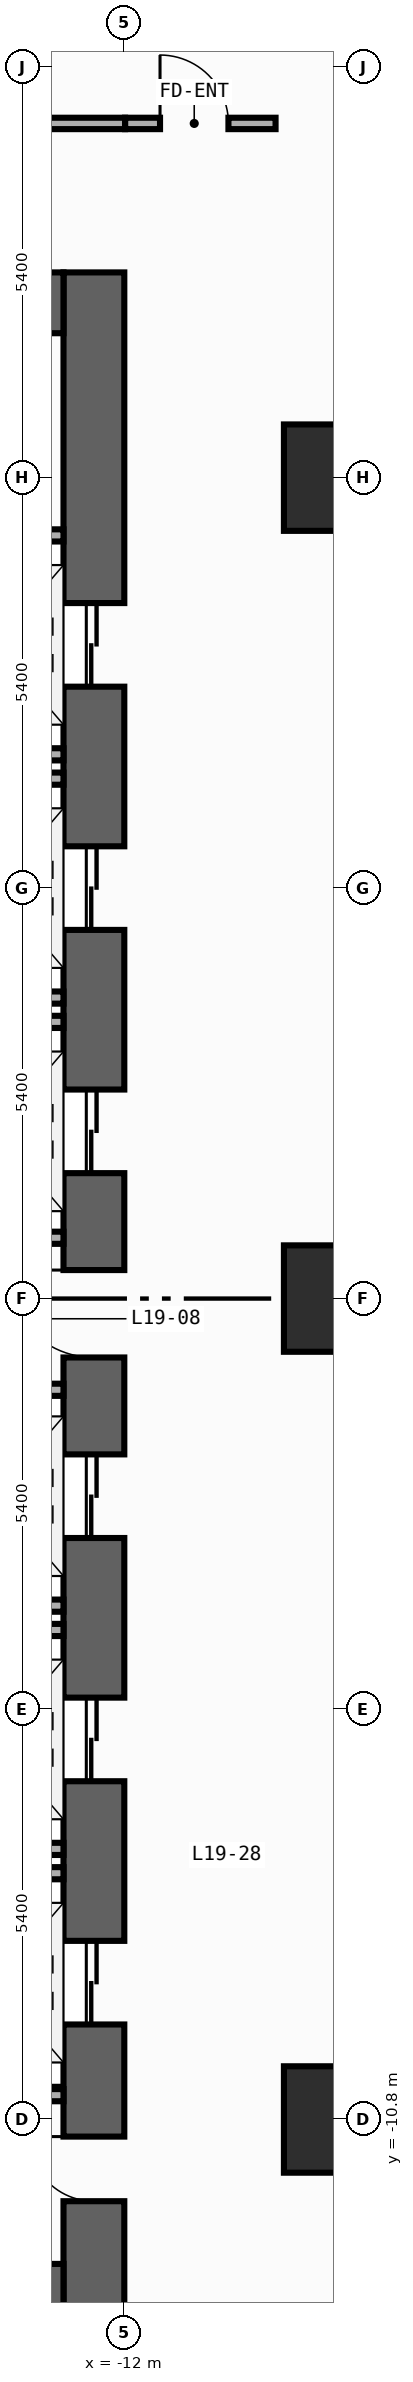
"""IFC4 building model, lengths in metres.
Left out: names, types, materials, properties, quantities, classifications, styles, units other than length and angle.
Written with IfcOpenShell. Run it as: python <this file> out.ifc"""

import sys

from ifc_helpers import new_model, si_unit, direction, frame, frame_2d, origin, origin_2d, place, context, subcontext, project, spatial, rectangle, extrude, element, fill, save


model = new_model("IFC4")
c1 = context("Model", 3, precision=1e-05, world=origin(), true_north=direction((0.0, 1.0)))
c2 = subcontext(c1, "Body", "Model", "MODEL_VIEW")
j1 = project(units=[si_unit("LENGTHUNIT", "METRE"), si_unit("PLANEANGLEUNIT", "RADIAN")], contexts=[c1])
p1 = place(None, origin())
s1 = spatial("IfcSite", under=j1, at=p1, CompositionType="ELEMENT")
p2 = place(p1, origin())
s2 = spatial("IfcBuilding", under=s1, at=p2, CompositionType="ELEMENT")
p3 = place(p2, frame((0.0, 0.0, 80.6)))
s3 = spatial("IfcBuildingStorey", under=s2, at=p3, CompositionType="ELEMENT", Elevation=80.6)
p4 = place(p3, frame((-12.4, -13.5, 0.0), z_axis=(0.0, 0.0, 1.0), x_axis=(0.0, 1.0, 0.0)))
e1 = element("IfcWall", 1, at=p4, inside=s3, PredefinedType="SHEAR", context=c2, shape_type="SweptSolid", body=[
    extrude(rectangle(XDim=27.0, YDim=0.8, at=frame_2d((13.5, 0.0))), origin(), (0.0, 0.0, 1.0), 3.85),
])
p5 = place(p4, frame((21.55, 0.0, 0.0)))
e2 = element("IfcOpeningElement", 2, at=p5, cuts=e1, PredefinedType="OPENING", context=c2, shape_type="SweptSolid", body=[
    extrude(rectangle(XDim=1.1, YDim=2.2, at=frame_2d((0.55, 1.1))), frame((0.0, 0.41, 0.0), z_axis=(0.0, -1.0, 0.0), x_axis=(1.0, 0.0, 0.0)), (0.0, 0.0, 1.0), 0.82),
])
p6 = place(p4, frame((18.35, 0.0, 0.0)))
e3 = element("IfcOpeningElement", 3, at=p6, cuts=e1, PredefinedType="OPENING", context=c2, shape_type="SweptSolid", body=[
    extrude(rectangle(XDim=1.1, YDim=2.2, at=frame_2d((0.55, 1.1))), frame((0.0, 0.41, 0.0), z_axis=(0.0, -1.0, 0.0), x_axis=(1.0, 0.0, 0.0)), (0.0, 0.0, 1.0), 0.82),
])
p7 = place(p4, frame((15.15, 0.0, 0.0)))
e4 = element("IfcOpeningElement", 4, at=p7, cuts=e1, PredefinedType="OPENING", context=c2, shape_type="SweptSolid", body=[
    extrude(rectangle(XDim=1.1, YDim=2.2, at=frame_2d((0.55, 1.1))), frame((0.0, 0.41, 0.0), z_axis=(0.0, -1.0, 0.0), x_axis=(1.0, 0.0, 0.0)), (0.0, 0.0, 1.0), 0.82),
])
p8 = place(p4, frame((10.35, 0.0, 0.0)))
e5 = element("IfcOpeningElement", 5, at=p8, cuts=e1, PredefinedType="OPENING", context=c2, shape_type="SweptSolid", body=[
    extrude(rectangle(XDim=1.1, YDim=2.2, at=frame_2d((0.55, 1.1))), frame((0.0, 0.41, 0.0), z_axis=(0.0, -1.0, 0.0), x_axis=(1.0, 0.0, 0.0)), (0.0, 0.0, 1.0), 0.82),
])
p9 = place(p4, frame((7.15, 0.0, 0.0)))
e6 = element("IfcOpeningElement", 6, at=p9, cuts=e1, PredefinedType="OPENING", context=c2, shape_type="SweptSolid", body=[
    extrude(rectangle(XDim=1.1, YDim=2.2, at=frame_2d((0.55, 1.1))), frame((0.0, 0.41, 0.0), z_axis=(0.0, -1.0, 0.0), x_axis=(1.0, 0.0, 0.0)), (0.0, 0.0, 1.0), 0.82),
])
p10 = place(p4, frame((3.95, 0.0, 0.0)))
e7 = element("IfcOpeningElement", 7, at=p10, cuts=e1, PredefinedType="OPENING", context=c2, shape_type="SweptSolid", body=[
    extrude(rectangle(XDim=1.1, YDim=2.2, at=frame_2d((0.55, 1.1))), frame((0.0, 0.41, 0.0), z_axis=(0.0, -1.0, 0.0), x_axis=(1.0, 0.0, 0.0)), (0.0, 0.0, 1.0), 0.82),
])
p11 = place(p4, frame((12.725, 0.0, 0.0)))
e8 = element("IfcOpeningElement", 8, at=p11, cuts=e1, PredefinedType="OPENING", context=c2, shape_type="SweptSolid", body=[
    extrude(rectangle(XDim=1.15, YDim=2.2, at=frame_2d((0.575, 1.1))), frame((0.0, 0.41, 0.0), z_axis=(0.0, -1.0, 0.0), x_axis=(1.0, 0.0, 0.0)), (0.0, 0.0, 1.0), 0.82),
])
p12 = place(p4, frame((1.625, 0.0, 0.0)))
e9 = element("IfcOpeningElement", 9, at=p12, cuts=e1, PredefinedType="OPENING", context=c2, shape_type="SweptSolid", body=[
    extrude(rectangle(XDim=0.85, YDim=2.1, at=frame_2d((0.425, 1.05))), frame((0.0, 0.41, 0.0), z_axis=(0.0, -1.0, 0.0), x_axis=(1.0, 0.0, 0.0)), (0.0, 0.0, 1.0), 0.82),
])
for number, where, z_axis, x_axis in (
    (10, (-19.6, -13.1, 0.0), (0.0, 0.0, 1.0), (1.0, 0.0, 0.0)),
    (11, (-19.6, 13.1, 0.0), (0.0, 0.0, 1.0), (1.0, 0.0, 0.0)),
):
    element("IfcWall", number, at=place(p3, frame(where, z_axis=z_axis, x_axis=x_axis)), inside=s3, PredefinedType="SHEAR", context=c2, shape_type="SweptSolid", body=[
        extrude(rectangle(XDim=6.8, YDim=0.8, at=frame_2d((3.4, 0.0))), origin(), (0.0, 0.0, 1.0), 3.85),
    ])
for number, where, z_axis, x_axis in (
    (12, (-9.2, -10.8, 0.0), (0.0, 0.0, 1.0), (1.0, 0.0, 0.0)),
    (13, (-9.2, 0.0, 0.0), (0.0, 0.0, 1.0), (1.0, 0.0, 0.0)),
    (14, (-9.2, 10.8, 0.0), (0.0, 0.0, 1.0), (1.0, 0.0, 0.0)),
):
    element("IfcColumn", number, at=place(p3, frame(where, z_axis=z_axis, x_axis=x_axis)), inside=s3, PredefinedType="COLUMN", context=c2, shape_type="SweptSolid", body=[
        extrude(rectangle(XDim=1.4, YDim=1.4, at=origin_2d()), origin(), (0.0, 0.0, 1.0), 4.2),
    ])
for number, where, z_axis, x_axis in (
    (15, (-14.99, 7.16, 0.0), (0.0, 0.0, 1.0), (1.0, 0.0, 0.0)),
    (16, (-14.99, 10.04, 0.0), (0.0, 0.0, 1.0), (1.0, 0.0, 0.0)),
    (17, (-14.99, 3.96, 0.0), (0.0, 0.0, 1.0), (1.0, 0.0, 0.0)),
    (18, (-14.99, 6.84, 0.0), (0.0, 0.0, 1.0), (1.0, 0.0, 0.0)),
    (19, (-14.99, 3.64, 0.0), (0.0, 0.0, 1.0), (1.0, 0.0, 0.0)),
    (20, (-14.99, -4.04, 0.0), (0.0, 0.0, 1.0), (1.0, 0.0, 0.0)),
    (21, (-14.99, -7.24, 0.0), (0.0, 0.0, 1.0), (1.0, 0.0, 0.0)),
    (22, (-14.99, -4.36, 0.0), (0.0, 0.0, 1.0), (1.0, 0.0, 0.0)),
    (23, (-14.99, -7.56, 0.0), (0.0, 0.0, 1.0), (1.0, 0.0, 0.0)),
):
    element("IfcWall", number, at=place(p3, frame(where, z_axis=z_axis, x_axis=x_axis)), inside=s3, PredefinedType="STANDARD", context=c2, shape_type="SweptSolid", body=[
        extrude(rectangle(XDim=2.19, YDim=0.16, at=frame_2d((1.095, 0.0))), origin(), (0.0, 0.0, 1.0), 3.85),
    ])
for number, where, z_axis, x_axis in (
    (24, (-15.4, 0.8, 0.0), (0.0, 0.0, 1.0), (1.0, 0.0, 0.0)),
    (25, (-15.4, -1.2, 0.0), (0.0, 0.0, 1.0), (1.0, 0.0, 0.0)),
    (26, (-15.4, -10.48, 0.0), (0.0, 0.0, 1.0), (1.0, 0.0, 0.0)),
):
    element("IfcWall", number, at=place(p3, frame(where, z_axis=z_axis, x_axis=x_axis)), inside=s3, PredefinedType="STANDARD", context=c2, shape_type="SweptSolid", body=[
        extrude(rectangle(XDim=2.6, YDim=0.16, at=frame_2d((1.3, 0.0))), origin(), (0.0, 0.0, 1.0), 3.85),
    ])
p13 = place(p3, frame((-11.99, 15.46, 0.0), z_axis=(0.0, 0.0, 1.0), x_axis=(1.0, 0.0, 0.0)))
e27 = element("IfcWall", 27, at=p13, inside=s3, PredefinedType="PARTITIONING", context=c2, shape_type="SweptSolid", body=[
    extrude(rectangle(XDim=1.98, YDim=0.15, at=frame_2d((0.99, 0.0))), origin(), (0.0, 0.0, 1.0), 3.85),
])
p14 = place(p13, frame((0.46, 0.0, 0.0)))
e28 = element("IfcOpeningElement", 28, at=p14, cuts=e27, PredefinedType="OPENING", context=c2, shape_type="SweptSolid", body=[
    extrude(rectangle(XDim=0.9, YDim=2.15, at=frame_2d((0.45, 1.075))), frame((0.0, 0.085, 0.0), z_axis=(0.0, -1.0, 0.0), x_axis=(1.0, 0.0, 0.0)), (0.0, 0.0, 1.0), 0.17),
])
p15 = place(p3, frame((-13.328, 15.46, 0.0), z_axis=(0.0, 0.0, 1.0), x_axis=(1.0, 0.0, 0.0)))
e29 = element("IfcWall", 29, at=p15, inside=s3, PredefinedType="PARTITIONING", context=c2, shape_type="SweptSolid", body=[
    extrude(rectangle(XDim=1.338, YDim=0.15, at=frame_2d((0.669, 0.0))), origin(), (0.0, 0.0, 1.0), 3.85),
])
p16 = place(p5, origin())
e30 = element("IfcDoor", 30, at=p16, inside=s3, OperationType="DOUBLE_DOOR_SLIDING", PredefinedType="DOOR", context=c2, shape_type="SweptSolid", body=[
    extrude(rectangle(XDim=1.1, YDim=2.2, at=frame_2d((0.55, 1.1))), frame((0.0, 0.025, 0.0), z_axis=(0.0, -1.0, 0.0), x_axis=(1.0, 0.0, 0.0)), (0.0, 0.0, 1.0), 0.05),
])
fill(e2, e30)
p17 = place(p6, origin())
e31 = element("IfcDoor", 31, at=p17, inside=s3, OperationType="DOUBLE_DOOR_SLIDING", PredefinedType="DOOR", context=c2, shape_type="SweptSolid", body=[
    extrude(rectangle(XDim=1.1, YDim=2.2, at=frame_2d((0.55, 1.1))), frame((0.0, 0.025, 0.0), z_axis=(0.0, -1.0, 0.0), x_axis=(1.0, 0.0, 0.0)), (0.0, 0.0, 1.0), 0.05),
])
fill(e3, e31)
p18 = place(p7, origin())
e32 = element("IfcDoor", 32, at=p18, inside=s3, OperationType="DOUBLE_DOOR_SLIDING", PredefinedType="DOOR", context=c2, shape_type="SweptSolid", body=[
    extrude(rectangle(XDim=1.1, YDim=2.2, at=frame_2d((0.55, 1.1))), frame((0.0, 0.025, 0.0), z_axis=(0.0, -1.0, 0.0), x_axis=(1.0, 0.0, 0.0)), (0.0, 0.0, 1.0), 0.05),
])
fill(e4, e32)
p19 = place(p8, origin())
e33 = element("IfcDoor", 33, at=p19, inside=s3, OperationType="DOUBLE_DOOR_SLIDING", PredefinedType="DOOR", context=c2, shape_type="SweptSolid", body=[
    extrude(rectangle(XDim=1.1, YDim=2.2, at=frame_2d((0.55, 1.1))), frame((0.0, 0.025, 0.0), z_axis=(0.0, -1.0, 0.0), x_axis=(1.0, 0.0, 0.0)), (0.0, 0.0, 1.0), 0.05),
])
fill(e5, e33)
p20 = place(p9, origin())
e34 = element("IfcDoor", 34, at=p20, inside=s3, OperationType="DOUBLE_DOOR_SLIDING", PredefinedType="DOOR", context=c2, shape_type="SweptSolid", body=[
    extrude(rectangle(XDim=1.1, YDim=2.2, at=frame_2d((0.55, 1.1))), frame((0.0, 0.025, 0.0), z_axis=(0.0, -1.0, 0.0), x_axis=(1.0, 0.0, 0.0)), (0.0, 0.0, 1.0), 0.05),
])
fill(e6, e34)
p21 = place(p10, origin())
e35 = element("IfcDoor", 35, at=p21, inside=s3, OperationType="DOUBLE_DOOR_SLIDING", PredefinedType="DOOR", context=c2, shape_type="SweptSolid", body=[
    extrude(rectangle(XDim=1.1, YDim=2.2, at=frame_2d((0.55, 1.1))), frame((0.0, 0.025, 0.0), z_axis=(0.0, -1.0, 0.0), x_axis=(1.0, 0.0, 0.0)), (0.0, 0.0, 1.0), 0.05),
])
fill(e7, e35)
p22 = place(p11, origin())
e36 = element("IfcDoor", 36, at=p22, inside=s3, OperationType="SINGLE_SWING_RIGHT", PredefinedType="DOOR", context=c2, shape_type="SweptSolid", body=[
    extrude(rectangle(XDim=1.15, YDim=2.2, at=frame_2d((0.575, 1.1))), frame((0.0, 0.025, 0.0), z_axis=(0.0, -1.0, 0.0), x_axis=(1.0, 0.0, 0.0)), (0.0, 0.0, 1.0), 0.05),
])
fill(e8, e36)
p23 = place(p12, origin())
e37 = element("IfcDoor", 37, at=p23, inside=s3, OperationType="SINGLE_SWING_RIGHT", PredefinedType="DOOR", context=c2, shape_type="SweptSolid", body=[
    extrude(rectangle(XDim=0.85, YDim=2.1, at=frame_2d((0.425, 1.05))), frame((0.0, 0.025, 0.0), z_axis=(0.0, -1.0, 0.0), x_axis=(1.0, 0.0, 0.0)), (0.0, 0.0, 1.0), 0.05),
])
fill(e9, e37)
p24 = place(p14, origin())
e38 = element("IfcDoor", 38, at=p24, inside=s3, OperationType="SINGLE_SWING_LEFT", PredefinedType="DOOR", context=c2, shape_type="SweptSolid", body=[
    extrude(rectangle(XDim=0.9, YDim=2.15, at=frame_2d((0.45, 1.075))), frame((0.0, 0.025, 0.0), z_axis=(0.0, -1.0, 0.0), x_axis=(1.0, 0.0, 0.0)), (0.0, 0.0, 1.0), 0.05),
])
fill(e28, e38)
save(model, sys.argv[1])
